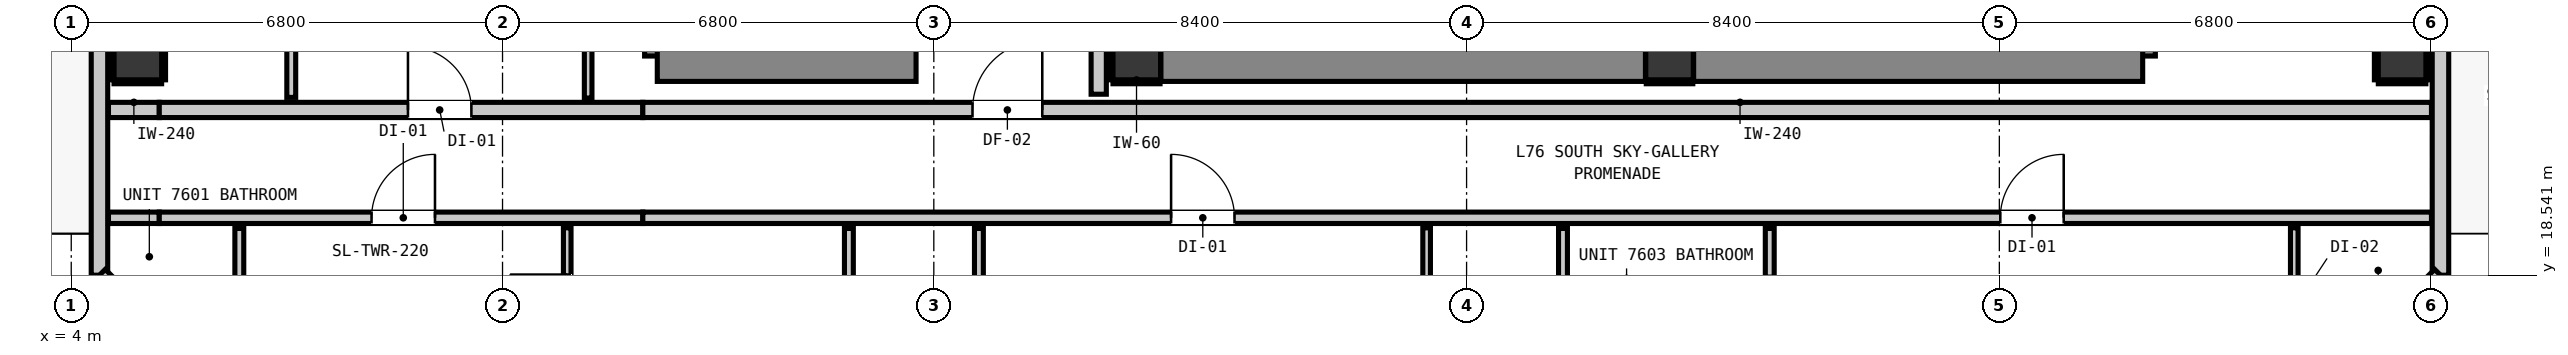
"""IFC4 building model, lengths in metres.
Left out: names, types, materials, properties, quantities, classifications, styles, units other than length and angle.
Written with IfcOpenShell. Run it as: python <this file> out.ifc"""

import sys

from ifc_helpers import new_model, si_unit, direction, frame, frame_2d, origin, origin_2d, place, context, subcontext, project, spatial, rectangle, extrude, element, fill, save


model = new_model("IFC4")
c1 = context("Model", 3, precision=1e-05, world=origin(), true_north=direction((0.0, 1.0)))
c2 = subcontext(c1, "Body", "Model", "MODEL_VIEW")
j1 = project(units=[si_unit("LENGTHUNIT", "METRE"), si_unit("PLANEANGLEUNIT", "RADIAN")], contexts=[c1])
p1 = place(None, origin())
s1 = spatial("IfcSite", under=j1, at=p1, CompositionType="ELEMENT")
p2 = place(p1, origin())
s2 = spatial("IfcBuilding", under=s1, at=p2, CompositionType="ELEMENT")
p3 = place(p2, frame((0.0, 0.0, 262.24)))
s3 = spatial("IfcBuildingStorey", under=s2, at=p3, CompositionType="ELEMENT", Elevation=262.24)
for number, where, z_axis, x_axis in (
    (1, (20.8, 22.0, 0.0), (0.0, 0.0, 1.0), (1.0, 0.0, 0.0)),
    (2, (29.2, 22.0, 0.0), (0.0, 0.0, 1.0), (1.0, 0.0, 0.0)),
):
    element("IfcColumn", number, at=place(p3, frame(where, z_axis=z_axis, x_axis=x_axis)), inside=s3, PredefinedType="COLUMN", context=c2, shape_type="SweptSolid", body=[
        extrude(rectangle(XDim=0.75, YDim=0.75, at=origin_2d()), origin(), (0.0, 0.0, 1.0), 3.32),
    ])
p4 = place(p3, frame((13.44, 22.0, 0.0), z_axis=(0.0, 0.0, 1.0), x_axis=(0.0, 1.0, 0.0)))
e3 = element("IfcWall", 3, at=p4, inside=s3, PredefinedType="SHEAR", context=c2, shape_type="SweptSolid", body=[
    extrude(rectangle(XDim=8.32, YDim=0.8, at=frame_2d((4.16, 0.0))), origin(), (0.0, 0.0, 1.0), 3.32),
])
p5 = place(p3, frame((13.24, 22.0, 0.0), z_axis=(0.0, 0.0, 1.0), x_axis=(1.0, 0.0, 0.0)))
e4 = element("IfcWall", 4, at=p5, inside=s3, PredefinedType="SHEAR", context=c2, shape_type="SweptSolid", body=[
    extrude(rectangle(XDim=4.08, YDim=0.8, at=frame_2d((2.04, 0.0))), origin(), (0.0, 0.0, 1.0), 3.32),
])
p6 = place(p3, frame((36.46, 22.0, 0.0), z_axis=(0.0, 0.0, 1.0), x_axis=(0.0, 1.0, 0.0)))
e5 = element("IfcWall", 5, at=p6, inside=s3, PredefinedType="SHEAR", context=c2, shape_type="SweptSolid", body=[
    extrude(rectangle(XDim=8.32, YDim=0.8, at=frame_2d((4.16, 0.0))), origin(), (0.0, 0.0, 1.0), 3.32),
])
p7 = place(p3, frame((29.58, 22.0, 0.0), z_axis=(0.0, 0.0, 1.0), x_axis=(1.0, 0.0, 0.0)))
e6 = element("IfcWall", 6, at=p7, inside=s3, PredefinedType="SHEAR", context=c2, shape_type="SweptSolid", body=[
    extrude(rectangle(XDim=7.08, YDim=0.8, at=frame_2d((3.54, 0.0))), origin(), (0.0, 0.0, 1.0), 3.32),
])
p8 = place(p3, frame((21.18, 22.0, 0.0), z_axis=(0.0, 0.0, 1.0), x_axis=(1.0, 0.0, 0.0)))
e7 = element("IfcWall", 7, at=p8, inside=s3, PredefinedType="SHEAR", context=c2, shape_type="SweptSolid", body=[
    extrude(rectangle(XDim=7.64, YDim=0.8, at=frame_2d((3.82, 0.0))), origin(), (0.0, 0.0, 1.0), 3.32),
])
for number, where, z_axis, x_axis in (
    (8, (5.05, 22.0, 0.0), (0.0, 0.0, 1.0), (1.0, 0.0, 0.0)),
    (9, (40.75, 22.0, 0.0), (0.0, 0.0, 1.0), (1.0, 0.0, 0.0)),
):
    element("IfcColumn", number, at=place(p3, frame(where, z_axis=z_axis, x_axis=x_axis)), inside=s3, PredefinedType="COLUMN", context=c2, shape_type="SweptSolid", body=[
        extrude(rectangle(XDim=0.75, YDim=0.75, at=origin_2d()), origin(), (0.0, 0.0, 1.0), 3.32),
    ])
p9 = place(p3, frame((4.445, 18.545, 0.0), z_axis=(0.0, 0.0, 1.0), x_axis=(0.0, 1.0, 0.0)))
e10 = element("IfcWall", 10, at=p9, inside=s3, PredefinedType="STANDARD", context=c2, shape_type="SweptSolid", body=[
    extrude(rectangle(XDim=30.31, YDim=0.26, at=frame_2d((15.155, 0.0))), origin(), (0.0, 0.0, 1.0), 3.1),
])
p10 = place(p9, frame((4.434, 0.0, 0.0)))
e11 = element("IfcOpeningElement", 11, at=p10, cuts=e10, PredefinedType="OPENING", context=c2, shape_type="SweptSolid", body=[
    extrude(rectangle(XDim=1.0, YDim=2.15, at=frame_2d((0.5, 1.075))), frame((0.0, 0.14, 0.0), z_axis=(0.0, -1.0, 0.0), x_axis=(1.0, 0.0, 0.0)), (0.0, 0.0, 1.0), 0.28),
])
p11 = place(p9, frame((28.316, 0.0, 0.85)))
e12 = element("IfcOpeningElement", 12, at=p11, cuts=e10, PredefinedType="OPENING", context=c2, shape_type="SweptSolid", body=[
    extrude(rectangle(XDim=0.9, YDim=1.5, at=frame_2d((0.45, 0.75))), frame((0.0, 0.14, 0.0), z_axis=(0.0, -1.0, 0.0), x_axis=(1.0, 0.0, 0.0)), (0.0, 0.0, 1.0), 0.28),
])
p12 = place(p9, frame((16.055, 0.0, 0.85)))
e13 = element("IfcOpeningElement", 13, at=p12, cuts=e10, PredefinedType="OPENING", context=c2, shape_type="SweptSolid", body=[
    extrude(rectangle(XDim=0.9, YDim=1.5, at=frame_2d((0.45, 0.75))), frame((0.0, 0.14, 0.0), z_axis=(0.0, -1.0, 0.0), x_axis=(1.0, 0.0, 0.0)), (0.0, 0.0, 1.0), 0.28),
])
p13 = place(p3, frame((41.355, 48.855, 0.0), z_axis=(0.0, 0.0, 1.0), x_axis=(0.0, -1.0, 0.0)))
e14 = element("IfcWall", 14, at=p13, inside=s3, PredefinedType="STANDARD", context=c2, shape_type="SweptSolid", body=[
    extrude(rectangle(XDim=30.31, YDim=0.26, at=frame_2d((15.155, 0.0))), origin(), (0.0, 0.0, 1.0), 3.1),
])
p14 = place(p13, frame((0.91, 0.0, 0.0)))
e15 = element("IfcOpeningElement", 15, at=p14, cuts=e14, PredefinedType="OPENING", context=c2, shape_type="SweptSolid", body=[
    extrude(rectangle(XDim=1.0, YDim=2.15, at=frame_2d((0.5, 1.075))), frame((0.0, 0.14, 0.0), z_axis=(0.0, -1.0, 0.0), x_axis=(1.0, 0.0, 0.0)), (0.0, 0.0, 1.0), 0.28),
])
p15 = place(p13, frame((4.007, 0.0, 0.85)))
e16 = element("IfcOpeningElement", 16, at=p15, cuts=e14, PredefinedType="OPENING", context=c2, shape_type="SweptSolid", body=[
    extrude(rectangle(XDim=0.9, YDim=1.5, at=frame_2d((0.45, 0.75))), frame((0.0, 0.14, 0.0), z_axis=(0.0, -1.0, 0.0), x_axis=(1.0, 0.0, 0.0)), (0.0, 0.0, 1.0), 0.28),
])
for number, where, z_axis, x_axis in (
    (17, (41.355, 18.545, 0.0), (0.0, 0.0, 1.0), (-0.707, -0.707, 0.0)),
    (18, (6.545, 16.445, 0.0), (0.0, 0.0, 1.0), (-0.707, 0.707, 0.0)),
):
    element("IfcWall", number, at=place(p3, frame(where, z_axis=z_axis, x_axis=x_axis)), inside=s3, PredefinedType="STANDARD", context=c2, shape_type="SweptSolid", body=[
        extrude(rectangle(XDim=2.97, YDim=0.26, at=frame_2d((1.485, 0.0))), origin(), (0.0, 0.0, 1.0), 3.1),
    ])
p16 = place(p3, frame((4.587, 21.15, 0.0), z_axis=(0.0, 0.0, 1.0), x_axis=(1.0, 0.0, 0.0)))
e19 = element("IfcWall", 19, at=p16, inside=s3, PredefinedType="PARTITIONING", context=c2, shape_type="SweptSolid", body=[
    extrude(rectangle(XDim=0.801, YDim=0.24, at=frame_2d((0.4, 0.0))), origin(), (0.0, 0.0, 1.0), 3.1),
])
p17 = place(p3, frame((5.388, 21.15, 0.0), z_axis=(0.0, 0.0, 1.0), x_axis=(1.0, 0.0, 0.0)))
e20 = element("IfcWall", 20, at=p17, inside=s3, PredefinedType="PARTITIONING", context=c2, shape_type="SweptSolid", body=[
    extrude(rectangle(XDim=7.624, YDim=0.24, at=frame_2d((3.812, 0.0))), origin(), (0.0, 0.0, 1.0), 2.477),
])
p18 = place(p17, frame((3.921, 0.0, 0.0)))
e21 = element("IfcOpeningElement", 21, at=p18, cuts=e20, PredefinedType="OPENING", context=c2, shape_type="SweptSolid", body=[
    extrude(rectangle(XDim=1.0, YDim=2.15, at=frame_2d((0.5, 1.075))), frame((0.0, 0.13, 0.0), z_axis=(0.0, -1.0, 0.0), x_axis=(1.0, 0.0, 0.0)), (0.0, 0.0, 1.0), 0.26),
])
p19 = place(p3, frame((13.012, 21.15, 0.0), z_axis=(0.0, 0.0, 1.0), x_axis=(1.0, 0.0, 0.0)))
e22 = element("IfcWall", 22, at=p19, inside=s3, PredefinedType="PARTITIONING", context=c2, shape_type="SweptSolid", body=[
    extrude(rectangle(XDim=28.201, YDim=0.24, at=frame_2d((14.101, 0.0))), origin(), (0.0, 0.0, 1.0), 3.1),
])
p20 = place(p19, frame((5.198, 0.0, 0.0)))
e23 = element("IfcOpeningElement", 23, at=p20, cuts=e22, PredefinedType="OPENING", context=c2, shape_type="SweptSolid", body=[
    extrude(rectangle(XDim=1.1, YDim=2.15, at=frame_2d((0.55, 1.075))), frame((0.0, 0.13, 0.0), z_axis=(0.0, -1.0, 0.0), x_axis=(1.0, 0.0, 0.0)), (0.0, 0.0, 1.0), 0.26),
])
p21 = place(p3, frame((4.587, 19.45, 0.0), z_axis=(0.0, 0.0, 1.0), x_axis=(1.0, 0.0, 0.0)))
e24 = element("IfcWall", 24, at=p21, inside=s3, PredefinedType="PARTITIONING", context=c2, shape_type="SweptSolid", body=[
    extrude(rectangle(XDim=0.801, YDim=0.18, at=frame_2d((0.4, 0.0))), origin(), (0.0, 0.0, 1.0), 3.1),
])
p22 = place(p3, frame((5.388, 19.45, 0.0), z_axis=(0.0, 0.0, 1.0), x_axis=(1.0, 0.0, 0.0)))
e25 = element("IfcWall", 25, at=p22, inside=s3, PredefinedType="PARTITIONING", context=c2, shape_type="SweptSolid", body=[
    extrude(rectangle(XDim=7.624, YDim=0.18, at=frame_2d((3.812, 0.0))), origin(), (0.0, 0.0, 1.0), 2.477),
])
p23 = place(p22, frame((3.347, 0.0, 0.0)))
e26 = element("IfcOpeningElement", 26, at=p23, cuts=e25, PredefinedType="OPENING", context=c2, shape_type="SweptSolid", body=[
    extrude(rectangle(XDim=1.0, YDim=2.15, at=frame_2d((0.5, 1.075))), frame((0.0, 0.1, 0.0), z_axis=(0.0, -1.0, 0.0), x_axis=(1.0, 0.0, 0.0)), (0.0, 0.0, 1.0), 0.2),
])
p24 = place(p3, frame((13.012, 19.45, 0.0), z_axis=(0.0, 0.0, 1.0), x_axis=(1.0, 0.0, 0.0)))
e27 = element("IfcWall", 27, at=p24, inside=s3, PredefinedType="PARTITIONING", context=c2, shape_type="SweptSolid", body=[
    extrude(rectangle(XDim=28.201, YDim=0.18, at=frame_2d((14.101, 0.0))), origin(), (0.0, 0.0, 1.0), 3.1),
])
p25 = place(p24, frame((8.329, 0.0, 0.0)))
e28 = element("IfcOpeningElement", 28, at=p25, cuts=e27, PredefinedType="OPENING", context=c2, shape_type="SweptSolid", body=[
    extrude(rectangle(XDim=1.0, YDim=2.15, at=frame_2d((0.5, 1.075))), frame((0.0, 0.1, 0.0), z_axis=(0.0, -1.0, 0.0), x_axis=(1.0, 0.0, 0.0)), (0.0, 0.0, 1.0), 0.2),
])
p26 = place(p24, frame((21.403, 0.0, 0.0)))
e29 = element("IfcOpeningElement", 29, at=p26, cuts=e27, PredefinedType="OPENING", context=c2, shape_type="SweptSolid", body=[
    extrude(rectangle(XDim=1.0, YDim=2.15, at=frame_2d((0.5, 1.075))), frame((0.0, 0.1, 0.0), z_axis=(0.0, -1.0, 0.0), x_axis=(1.0, 0.0, 0.0)), (0.0, 0.0, 1.0), 0.2),
])
p27 = place(p3, frame((20.2, 21.398, 0.0), z_axis=(0.0, 0.0, 1.0), x_axis=(0.0, 1.0, 0.0)))
e30 = element("IfcWall", 30, at=p27, inside=s3, PredefinedType="PARTITIONING", context=c2, shape_type="SweptSolid", body=[
    extrude(rectangle(XDim=6.754, YDim=0.24, at=frame_2d((3.377, 0.0))), origin(), (0.0, 0.0, 1.0), 3.1),
])
p28 = place(p3, frame((6.65, 16.587, 0.0), z_axis=(0.0, 0.0, 1.0), x_axis=(0.0, 1.0, 0.0)))
e31 = element("IfcWall", 31, at=p28, inside=s3, PredefinedType="PARTITIONING", context=c2, shape_type="SweptSolid", body=[
    extrude(rectangle(XDim=2.695, YDim=0.14, at=frame_2d((1.348, 0.0))), origin(), (0.0, 0.0, 1.0), 3.1),
])
p29 = place(p28, frame((1.008, 0.0, 0.0)))
e32 = element("IfcOpeningElement", 32, at=p29, cuts=e31, PredefinedType="OPENING", context=c2, shape_type="SweptSolid", body=[
    extrude(rectangle(XDim=0.86, YDim=2.02, at=frame_2d((0.43, 1.01))), frame((0.0, 0.08, 0.0), z_axis=(0.0, -1.0, 0.0), x_axis=(1.0, 0.0, 0.0)), (0.0, 0.0, 1.0), 0.16),
])
p30 = place(p3, frame((7.469, 21.348, 0.0), z_axis=(0.0, 0.0, 1.0), x_axis=(0.0, 1.0, 0.0)))
e33 = element("IfcWall", 33, at=p30, inside=s3, PredefinedType="PARTITIONING", context=c2, shape_type="SweptSolid", body=[
    extrude(rectangle(XDim=3.373, YDim=0.14, at=frame_2d((1.687, 0.0))), origin(), (0.0, 0.0, 1.0), 3.1),
])
p31 = place(p30, frame((1.224, 0.0, 0.0)))
e34 = element("IfcOpeningElement", 34, at=p31, cuts=e33, PredefinedType="OPENING", context=c2, shape_type="SweptSolid", body=[
    extrude(rectangle(XDim=0.9, YDim=2.1, at=frame_2d((0.45, 1.05))), frame((0.0, 0.08, 0.0), z_axis=(0.0, -1.0, 0.0), x_axis=(1.0, 0.0, 0.0)), (0.0, 0.0, 1.0), 0.16),
])
p32 = place(p3, frame((16.261, 16.587, 0.0), z_axis=(0.0, 0.0, 1.0), x_axis=(0.0, 1.0, 0.0)))
e35 = element("IfcWall", 35, at=p32, inside=s3, PredefinedType="PARTITIONING", context=c2, shape_type="SweptSolid", body=[
    extrude(rectangle(XDim=2.695, YDim=0.14, at=frame_2d((1.348, 0.0))), origin(), (0.0, 0.0, 1.0), 3.1),
])
p33 = place(p3, frame((18.311, 16.587, 0.0), z_axis=(0.0, 0.0, 1.0), x_axis=(0.0, 1.0, 0.0)))
e36 = element("IfcWall", 36, at=p33, inside=s3, PredefinedType="PARTITIONING", context=c2, shape_type="SweptSolid", body=[
    extrude(rectangle(XDim=2.695, YDim=0.14, at=frame_2d((1.348, 0.0))), origin(), (0.0, 0.0, 1.0), 3.1),
])
p34 = place(p33, frame((1.008, 0.0, 0.0)))
e37 = element("IfcOpeningElement", 37, at=p34, cuts=e36, PredefinedType="OPENING", context=c2, shape_type="SweptSolid", body=[
    extrude(rectangle(XDim=0.86, YDim=2.02, at=frame_2d((0.43, 1.01))), frame((0.0, 0.08, 0.0), z_axis=(0.0, -1.0, 0.0), x_axis=(1.0, 0.0, 0.0)), (0.0, 0.0, 1.0), 0.16),
])
p35 = place(p3, frame((27.52, 16.587, 0.0), z_axis=(0.0, 0.0, 1.0), x_axis=(0.0, 1.0, 0.0)))
e38 = element("IfcWall", 38, at=p35, inside=s3, PredefinedType="PARTITIONING", context=c2, shape_type="SweptSolid", body=[
    extrude(rectangle(XDim=2.695, YDim=0.14, at=frame_2d((1.348, 0.0))), origin(), (0.0, 0.0, 1.0), 3.1),
])
p36 = place(p3, frame((30.78, 16.587, 0.0), z_axis=(0.0, 0.0, 1.0), x_axis=(0.0, 1.0, 0.0)))
e39 = element("IfcWall", 39, at=p36, inside=s3, PredefinedType="PARTITIONING", context=c2, shape_type="SweptSolid", body=[
    extrude(rectangle(XDim=2.695, YDim=0.14, at=frame_2d((1.348, 0.0))), origin(), (0.0, 0.0, 1.0), 3.1),
])
p37 = place(p36, frame((1.088, 0.0, 0.0)))
e40 = element("IfcOpeningElement", 40, at=p37, cuts=e39, PredefinedType="OPENING", context=c2, shape_type="SweptSolid", body=[
    extrude(rectangle(XDim=0.86, YDim=2.02, at=frame_2d((0.43, 1.01))), frame((0.0, 0.08, 0.0), z_axis=(0.0, -1.0, 0.0), x_axis=(1.0, 0.0, 0.0)), (0.0, 0.0, 1.0), 0.16),
])
p38 = place(p3, frame((11.82, 16.587, 0.0), z_axis=(0.0, 0.0, 1.0), x_axis=(0.0, 1.0, 0.0)))
e41 = element("IfcWall", 41, at=p38, inside=s3, PredefinedType="PARTITIONING", context=c2, shape_type="SweptSolid", body=[
    extrude(rectangle(XDim=2.705, YDim=0.12, at=frame_2d((1.353, 0.0))), origin(), (0.0, 0.0, 1.0), 3.1),
])
p39 = place(p38, frame((1.068, 0.0, 0.0)))
e42 = element("IfcOpeningElement", 42, at=p39, cuts=e41, PredefinedType="OPENING", context=c2, shape_type="SweptSolid", body=[
    extrude(rectangle(XDim=0.9, YDim=2.1, at=frame_2d((0.45, 1.05))), frame((0.0, 0.07, 0.0), z_axis=(0.0, -1.0, 0.0), x_axis=(1.0, 0.0, 0.0)), (0.0, 0.0, 1.0), 0.14),
])
p40 = place(p3, frame((12.15, 21.338, 0.0), z_axis=(0.0, 0.0, 1.0), x_axis=(0.0, 1.0, 0.0)))
e43 = element("IfcWall", 43, at=p40, inside=s3, PredefinedType="PARTITIONING", context=c2, shape_type="SweptSolid", body=[
    extrude(rectangle(XDim=8.324, YDim=0.12, at=frame_2d((4.162, 0.0))), origin(), (0.0, 0.0, 1.0), 3.1),
])
p41 = place(p3, frame((25.37, 16.587, 0.0), z_axis=(0.0, 0.0, 1.0), x_axis=(0.0, 1.0, 0.0)))
e44 = element("IfcWall", 44, at=p41, inside=s3, PredefinedType="PARTITIONING", context=c2, shape_type="SweptSolid", body=[
    extrude(rectangle(XDim=2.705, YDim=0.12, at=frame_2d((1.353, 0.0))), origin(), (0.0, 0.0, 1.0), 3.1),
])
p42 = place(p41, frame((0.988, 0.0, 0.0)))
e45 = element("IfcOpeningElement", 45, at=p42, cuts=e44, PredefinedType="OPENING", context=c2, shape_type="SweptSolid", body=[
    extrude(rectangle(XDim=0.9, YDim=2.1, at=frame_2d((0.45, 1.05))), frame((0.0, 0.07, 0.0), z_axis=(0.0, -1.0, 0.0), x_axis=(1.0, 0.0, 0.0)), (0.0, 0.0, 1.0), 0.14),
])
p43 = place(p3, frame((39.05, 16.587, 0.0), z_axis=(0.0, 0.0, 1.0), x_axis=(0.0, 1.0, 0.0)))
e46 = element("IfcWall", 46, at=p43, inside=s3, PredefinedType="PARTITIONING", context=c2, shape_type="SweptSolid", body=[
    extrude(rectangle(XDim=2.705, YDim=0.12, at=frame_2d((1.353, 0.0))), origin(), (0.0, 0.0, 1.0), 3.1),
])
p44 = place(p43, frame((0.988, 0.0, 0.0)))
e47 = element("IfcOpeningElement", 47, at=p44, cuts=e46, PredefinedType="OPENING", context=c2, shape_type="SweptSolid", body=[
    extrude(rectangle(XDim=0.9, YDim=2.1, at=frame_2d((0.45, 1.05))), frame((0.0, 0.07, 0.0), z_axis=(0.0, -1.0, 0.0), x_axis=(1.0, 0.0, 0.0)), (0.0, 0.0, 1.0), 0.14),
])
p45 = place(p3, frame((20.425, 21.593, 0.0), z_axis=(0.0, 0.0, 1.0), x_axis=(1.0, 0.0, 0.0)))
e48 = element("IfcWall", 48, at=p45, inside=s3, PredefinedType="PARTITIONING", context=c2, shape_type="SweptSolid", body=[
    extrude(rectangle(XDim=0.742, YDim=0.06, at=frame_2d((0.371, 0.0))), origin(), (0.0, 0.0, 1.0), 1.45),
])
p46 = place(p3, frame((20.393, 21.625, 0.0), z_axis=(0.0, 0.0, 1.0), x_axis=(0.0, 1.0, 0.0)))
e49 = element("IfcWall", 49, at=p46, inside=s3, PredefinedType="PARTITIONING", context=c2, shape_type="SweptSolid", body=[
    extrude(rectangle(XDim=0.75, YDim=0.06, at=frame_2d((0.375, 0.0))), origin(), (0.0, 0.0, 1.0), 1.45),
])
p47 = place(p3, frame((28.833, 21.593, 0.0), z_axis=(0.0, 0.0, 1.0), x_axis=(1.0, 0.0, 0.0)))
e50 = element("IfcWall", 50, at=p47, inside=s3, PredefinedType="PARTITIONING", context=c2, shape_type="SweptSolid", body=[
    extrude(rectangle(XDim=0.734, YDim=0.06, at=frame_2d((0.367, 0.0))), origin(), (0.0, 0.0, 1.0), 1.45),
])
for number, where, z_axis, x_axis in (
    (51, (4.675, 21.593, 0.0), (0.0, 0.0, 1.0), (1.0, 0.0, 0.0)),
    (52, (4.643, 21.625, 0.0), (0.0, 0.0, 1.0), (0.0, 1.0, 0.0)),
    (53, (5.457, 21.625, 0.0), (0.0, 0.0, 1.0), (0.0, 1.0, 0.0)),
    (54, (40.375, 21.593, 0.0), (0.0, 0.0, 1.0), (1.0, 0.0, 0.0)),
    (55, (40.343, 21.625, 0.0), (0.0, 0.0, 1.0), (0.0, 1.0, 0.0)),
    (56, (41.157, 21.625, 0.0), (0.0, 0.0, 1.0), (0.0, 1.0, 0.0)),
):
    element("IfcWall", number, at=place(p3, frame(where, z_axis=z_axis, x_axis=x_axis)), inside=s3, PredefinedType="PARTITIONING", context=c2, shape_type="SweptSolid", body=[
        extrude(rectangle(XDim=0.75, YDim=0.06, at=frame_2d((0.375, 0.0))), origin(), (0.0, 0.0, 1.0), 1.45),
    ])
p48 = place(p20, origin())
e57 = element("IfcDoor", 57, at=p48, inside=s3, OperationType="SINGLE_SWING_RIGHT", PredefinedType="DOOR", context=c2, shape_type="SweptSolid", body=[
    extrude(rectangle(XDim=1.1, YDim=2.15, at=frame_2d((0.55, 1.075))), frame((0.0, 0.025, 0.0), z_axis=(0.0, -1.0, 0.0), x_axis=(1.0, 0.0, 0.0)), (0.0, 0.0, 1.0), 0.05),
])
fill(e23, e57)
p49 = place(p23, origin())
e58 = element("IfcDoor", 58, at=p49, inside=s3, OperationType="SINGLE_SWING_RIGHT", PredefinedType="DOOR", context=c2, shape_type="SweptSolid", body=[
    extrude(rectangle(XDim=1.0, YDim=2.15, at=frame_2d((0.5, 1.075))), frame((0.0, 0.025, 0.0), z_axis=(0.0, -1.0, 0.0), x_axis=(1.0, 0.0, 0.0)), (0.0, 0.0, 1.0), 0.05),
])
fill(e26, e58)
p50 = place(p39, origin())
e59 = element("IfcDoor", 59, at=p50, inside=s3, OperationType="SINGLE_SWING_RIGHT", PredefinedType="DOOR", context=c2, shape_type="SweptSolid", body=[
    extrude(rectangle(XDim=0.9, YDim=2.1, at=frame_2d((0.45, 1.05))), frame((0.0, 0.025, 0.0), z_axis=(0.0, -1.0, 0.0), x_axis=(1.0, 0.0, 0.0)), (0.0, 0.0, 1.0), 0.05),
])
fill(e42, e59)
p51 = place(p25, origin())
e60 = element("IfcDoor", 60, at=p51, inside=s3, OperationType="SINGLE_SWING_LEFT", PredefinedType="DOOR", context=c2, shape_type="SweptSolid", body=[
    extrude(rectangle(XDim=1.0, YDim=2.15, at=frame_2d((0.5, 1.075))), frame((0.0, 0.025, 0.0), z_axis=(0.0, -1.0, 0.0), x_axis=(1.0, 0.0, 0.0)), (0.0, 0.0, 1.0), 0.05),
])
fill(e28, e60)
p52 = place(p26, origin())
e61 = element("IfcDoor", 61, at=p52, inside=s3, OperationType="SINGLE_SWING_RIGHT", PredefinedType="DOOR", context=c2, shape_type="SweptSolid", body=[
    extrude(rectangle(XDim=1.0, YDim=2.15, at=frame_2d((0.5, 1.075))), frame((0.0, 0.025, 0.0), z_axis=(0.0, -1.0, 0.0), x_axis=(1.0, 0.0, 0.0)), (0.0, 0.0, 1.0), 0.05),
])
fill(e29, e61)
p53 = place(p18, origin())
e62 = element("IfcDoor", 62, at=p53, inside=s3, OperationType="SINGLE_SWING_LEFT", PredefinedType="DOOR", context=c2, shape_type="SweptSolid", body=[
    extrude(rectangle(XDim=1.0, YDim=2.15, at=frame_2d((0.5, 1.075))), frame((0.0, 0.025, 0.0), z_axis=(0.0, -1.0, 0.0), x_axis=(1.0, 0.0, 0.0)), (0.0, 0.0, 1.0), 0.05),
])
fill(e21, e62)
save(model, sys.argv[1])
